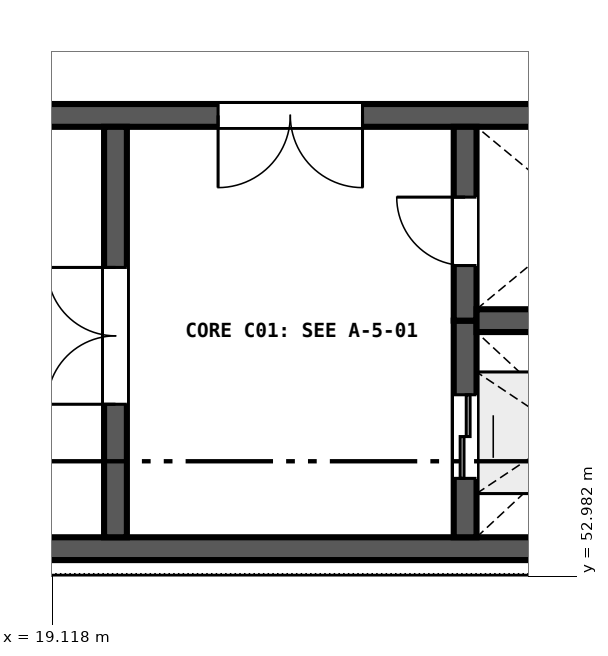
"""IFC4 building model, lengths in metres.
Left out: names, types, materials, properties, quantities, classifications, styles, units other than length and angle.
Written with IfcOpenShell. Run it as: python <this file> out.ifc"""

import sys

from ifc_helpers import new_model, si_unit, direction, frame, frame_2d, origin, place, context, subcontext, project, spatial, rectangle, extrude, element, fill, save


model = new_model("IFC4")
c1 = context("Model", 3, precision=1e-05, world=origin(), true_north=direction((0.0, 1.0)))
c2 = subcontext(c1, "Body", "Model", "MODEL_VIEW")
j1 = project(units=[si_unit("LENGTHUNIT", "METRE"), si_unit("PLANEANGLEUNIT", "RADIAN")], contexts=[c1])
p1 = place(None, origin())
s1 = spatial("IfcSite", under=j1, at=p1, CompositionType="ELEMENT")
p2 = place(p1, origin())
s2 = spatial("IfcBuilding", under=s1, at=p2, CompositionType="ELEMENT")
p3 = place(p2, frame((0.0, 0.0, 14.4)))
s3 = spatial("IfcBuildingStorey", under=s2, at=p3, CompositionType="ELEMENT", Elevation=14.4)
p4 = place(p3, frame((9.9, 53.35, 0.0), z_axis=(0.0, 0.0, 1.0), x_axis=(1.0, 0.0, 0.0)))
e1 = element("IfcWall", 1, at=p4, inside=s3, PredefinedType="SHEAR", context=c2, shape_type="SweptSolid", body=[
    extrude(rectangle(XDim=18.0, YDim=0.3, at=frame_2d((9.0, 0.0))), origin(), (0.0, 0.0, 1.0), 4.48),
])
p5 = place(p3, frame((27.9, 59.05, 0.0), z_axis=(0.0, 0.0, 1.0), x_axis=(-1.0, 0.0, 0.0)))
e2 = element("IfcWall", 2, at=p5, inside=s3, PredefinedType="SHEAR", context=c2, shape_type="SweptSolid", body=[
    extrude(rectangle(XDim=18.0, YDim=0.3, at=frame_2d((9.0, 0.0))), origin(), (0.0, 0.0, 1.0), 4.48),
])
p6 = place(p5, frame((4.7, 0.0, 0.0)))
e3 = element("IfcOpeningElement", 3, at=p6, cuts=e2, PredefinedType="OPENING", context=c2, shape_type="SweptSolid", body=[
    extrude(rectangle(XDim=1.9, YDim=2.25, at=frame_2d((0.95, 1.125))), frame((0.0, 0.16, 0.0), z_axis=(0.0, -1.0, 0.0), x_axis=(1.0, 0.0, 0.0)), (0.0, 0.0, 1.0), 0.32),
])
p7 = place(p3, frame((19.95, 53.5, 0.0), z_axis=(0.0, 0.0, 1.0), x_axis=(0.0, 1.0, 0.0)))
e4 = element("IfcWall", 4, at=p7, inside=s3, PredefinedType="SHEAR", context=c2, shape_type="SweptSolid", body=[
    extrude(rectangle(XDim=5.4, YDim=0.3, at=frame_2d((2.7, 0.0))), origin(), (0.0, 0.0, 1.0), 4.48),
])
p8 = place(p7, frame((1.75, 0.0, 0.0)))
e5 = element("IfcOpeningElement", 5, at=p8, cuts=e4, PredefinedType="OPENING", context=c2, shape_type="SweptSolid", body=[
    extrude(rectangle(XDim=1.8, YDim=2.25, at=frame_2d((0.9, 1.125))), frame((0.0, 0.16, 0.0), z_axis=(0.0, -1.0, 0.0), x_axis=(1.0, 0.0, 0.0)), (0.0, 0.0, 1.0), 0.32),
])
p9 = place(p3, frame((24.55, 53.5, 0.0), z_axis=(0.0, 0.0, 1.0), x_axis=(0.0, 1.0, 0.0)))
e6 = element("IfcWall", 6, at=p9, inside=s3, PredefinedType="SHEAR", context=c2, shape_type="SweptSolid", body=[
    extrude(rectangle(XDim=2.85, YDim=0.3, at=frame_2d((1.425, 0.0))), origin(), (0.0, 0.0, 1.0), 4.48),
])
p10 = place(p9, frame((0.775, 0.0, 0.0)))
e7 = element("IfcOpeningElement", 7, at=p10, cuts=e6, PredefinedType="OPENING", context=c2, shape_type="SweptSolid", body=[
    extrude(rectangle(XDim=1.1, YDim=2.1, at=frame_2d((0.55, 1.05))), frame((0.0, 0.16, 0.0), z_axis=(0.0, -1.0, 0.0), x_axis=(1.0, 0.0, 0.0)), (0.0, 0.0, 1.0), 0.32),
])
p11 = place(p3, frame((24.55, 56.35, 0.0), z_axis=(0.0, 0.0, 1.0), x_axis=(0.0, 1.0, 0.0)))
e8 = element("IfcWall", 8, at=p11, inside=s3, PredefinedType="SHEAR", context=c2, shape_type="SweptSolid", body=[
    extrude(rectangle(XDim=2.55, YDim=0.3, at=frame_2d((1.275, 0.0))), origin(), (0.0, 0.0, 1.0), 4.48),
])
p12 = place(p11, frame((0.725, 0.0, 0.0)))
e9 = element("IfcOpeningElement", 9, at=p12, cuts=e8, PredefinedType="OPENING", context=c2, shape_type="SweptSolid", body=[
    extrude(rectangle(XDim=0.9, YDim=2.1, at=frame_2d((0.45, 1.05))), frame((0.0, 0.16, 0.0), z_axis=(0.0, -1.0, 0.0), x_axis=(1.0, 0.0, 0.0)), (0.0, 0.0, 1.0), 0.32),
])
p13 = place(p3, frame((24.7, 56.35, 0.0), z_axis=(0.0, 0.0, 1.0), x_axis=(1.0, 0.0, 0.0)))
e10 = element("IfcWall", 10, at=p13, inside=s3, PredefinedType="SHEAR", context=c2, shape_type="SweptSolid", body=[
    extrude(rectangle(XDim=2.9, YDim=0.3, at=frame_2d((1.45, 0.0))), origin(), (0.0, 0.0, 1.0), 4.48),
])
p14 = place(p8, origin())
e11 = element("IfcDoor", 11, at=p14, inside=s3, OperationType="DOUBLE_DOOR_SINGLE_SWING", PredefinedType="DOOR", context=c2, shape_type="SweptSolid", body=[
    extrude(rectangle(XDim=1.8, YDim=2.25, at=frame_2d((0.9, 1.125))), frame((0.0, 0.025, 0.0), z_axis=(0.0, -1.0, 0.0), x_axis=(1.0, 0.0, 0.0)), (0.0, 0.0, 1.0), 0.05),
])
fill(e5, e11)
p15 = place(p12, origin())
e12 = element("IfcDoor", 12, at=p15, inside=s3, OperationType="SINGLE_SWING_RIGHT", PredefinedType="DOOR", context=c2, shape_type="SweptSolid", body=[
    extrude(rectangle(XDim=0.9, YDim=2.1, at=frame_2d((0.45, 1.05))), frame((0.0, 0.025, 0.0), z_axis=(0.0, -1.0, 0.0), x_axis=(1.0, 0.0, 0.0)), (0.0, 0.0, 1.0), 0.05),
])
fill(e9, e12)
p16 = place(p10, origin())
e13 = element("IfcDoor", 13, at=p16, inside=s3, OperationType="DOUBLE_DOOR_SLIDING", PredefinedType="DOOR", context=c2, shape_type="SweptSolid", body=[
    extrude(rectangle(XDim=1.1, YDim=2.1, at=frame_2d((0.55, 1.05))), frame((0.0, 0.025, 0.0), z_axis=(0.0, -1.0, 0.0), x_axis=(1.0, 0.0, 0.0)), (0.0, 0.0, 1.0), 0.05),
])
fill(e7, e13)
p17 = place(p6, origin())
e14 = element("IfcDoor", 14, at=p17, inside=s3, OperationType="DOUBLE_DOOR_SINGLE_SWING", PredefinedType="DOOR", context=c2, shape_type="SweptSolid", body=[
    extrude(rectangle(XDim=1.9, YDim=2.25, at=frame_2d((0.95, 1.125))), frame((0.0, 0.025, 0.0), z_axis=(0.0, -1.0, 0.0), x_axis=(1.0, 0.0, 0.0)), (0.0, 0.0, 1.0), 0.05),
])
fill(e3, e14)
save(model, sys.argv[1])
